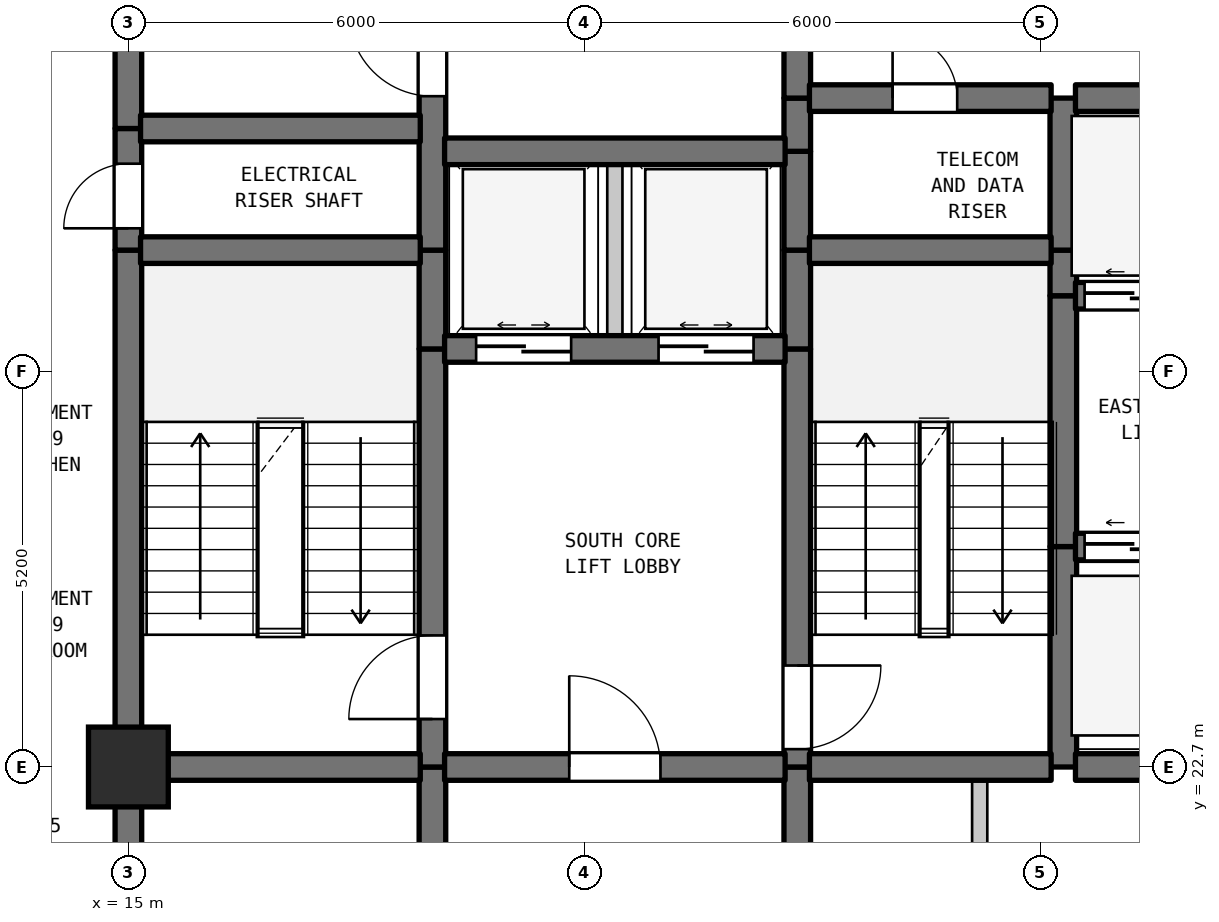
"""IFC4 building model, lengths in metres.
Left out: names, types, materials, properties, quantities, classifications, styles, units other than length and angle.
Written with IfcOpenShell. Run it as: python <this file> out.ifc"""

import sys

from ifc_helpers import new_model, si_unit, direction, frame, frame_2d, origin, origin_2d, place, context, subcontext, project, spatial, rectangle, extrude, element, fill, save


model = new_model("IFC4")
c1 = context("Model", 3, precision=1e-05, world=origin(), true_north=direction((0.0, 1.0)))
c2 = subcontext(c1, "Body", "Model", "MODEL_VIEW")
j1 = project(units=[si_unit("LENGTHUNIT", "METRE"), si_unit("PLANEANGLEUNIT", "RADIAN")], contexts=[c1])
p1 = place(None, origin())
s1 = spatial("IfcSite", under=j1, at=p1, CompositionType="ELEMENT")
p2 = place(p1, origin())
s2 = spatial("IfcBuilding", under=s1, at=p2, CompositionType="ELEMENT")
p3 = place(p2, frame((0.0, 0.0, 102.0)))
s3 = spatial("IfcBuildingStorey", under=s2, at=p3, CompositionType="ELEMENT", Elevation=102.0)
p4 = place(p3, frame((15.0, 22.7, 0.0), z_axis=(0.0, 0.0, 1.0), x_axis=(1.0, 0.0, 0.0)))
e1 = element("IfcColumn", 1, at=p4, inside=s3, PredefinedType="COLUMN", context=c2, shape_type="SweptSolid", body=[
    extrude(rectangle(XDim=1.05, YDim=1.05, at=origin_2d()), origin(), (0.0, 0.0, 1.0), 3.7),
])
p5 = place(p3, frame((15.0, 19.5, 0.0), z_axis=(0.0, 0.0, 1.0), x_axis=(0.0, 1.0, 0.0)))
e2 = element("IfcWall", 2, at=p5, inside=s3, PredefinedType="SHEAR", context=c2, shape_type="SweptSolid", body=[
    extrude(rectangle(XDim=3.2, YDim=0.35, at=frame_2d((1.6, 0.0))), origin(), (0.0, 0.0, 1.0), 3.385),
])
p6 = place(p3, frame((15.0, 22.7, 0.0), z_axis=(0.0, 0.0, 1.0), x_axis=(0.0, 1.0, 0.0)))
e3 = element("IfcWall", 3, at=p6, inside=s3, PredefinedType="SHEAR", context=c2, shape_type="SweptSolid", body=[
    extrude(rectangle(XDim=6.8, YDim=0.35, at=frame_2d((3.4, 0.0))), origin(), (0.0, 0.0, 1.0), 3.385),
])
p7 = place(p3, frame((15.0, 29.5, 0.0), z_axis=(0.0, 0.0, 1.0), x_axis=(0.0, 1.0, 0.0)))
e4 = element("IfcWall", 4, at=p7, inside=s3, PredefinedType="SHEAR", context=c2, shape_type="SweptSolid", body=[
    extrude(rectangle(XDim=1.6, YDim=0.35, at=frame_2d((0.8, 0.0))), origin(), (0.0, 0.0, 1.0), 3.385),
])
p8 = place(p7, frame((0.287, 0.0, 0.0)))
e5 = element("IfcOpeningElement", 5, at=p8, cuts=e4, PredefinedType="OPENING", context=c2, shape_type="SweptSolid", body=[
    extrude(rectangle(XDim=0.85, YDim=2.1, at=frame_2d((0.425, 1.05))), frame((0.0, 0.185, 0.0), z_axis=(0.0, -1.0, 0.0), x_axis=(1.0, 0.0, 0.0)), (0.0, 0.0, 1.0), 0.37),
])
p9 = place(p3, frame((15.0, 31.1, 0.0), z_axis=(0.0, 0.0, 1.0), x_axis=(0.0, 1.0, 0.0)))
e6 = element("IfcWall", 6, at=p9, inside=s3, PredefinedType="SHEAR", context=c2, shape_type="SweptSolid", body=[
    extrude(rectangle(XDim=6.8, YDim=0.35, at=frame_2d((3.4, 0.0))), origin(), (0.0, 0.0, 1.0), 3.385),
])
p10 = place(p3, frame((19.0, 19.5, 0.0), z_axis=(0.0, 0.0, 1.0), x_axis=(0.0, 1.0, 0.0)))
e7 = element("IfcWall", 7, at=p10, inside=s3, PredefinedType="SHEAR", context=c2, shape_type="SweptSolid", body=[
    extrude(rectangle(XDim=3.2, YDim=0.35, at=frame_2d((1.6, 0.0))), origin(), (0.0, 0.0, 1.0), 3.385),
])
p11 = place(p3, frame((19.0, 22.7, 0.0), z_axis=(0.0, 0.0, 1.0), x_axis=(0.0, 1.0, 0.0)))
e8 = element("IfcWall", 8, at=p11, inside=s3, PredefinedType="SHEAR", context=c2, shape_type="SweptSolid", body=[
    extrude(rectangle(XDim=5.5, YDim=0.35, at=frame_2d((2.75, 0.0))), origin(), (0.0, 0.0, 1.0), 3.385),
])
p12 = place(p11, frame((0.631, 0.0, 0.0)))
e9 = element("IfcOpeningElement", 9, at=p12, cuts=e8, PredefinedType="OPENING", context=c2, shape_type="SweptSolid", body=[
    extrude(rectangle(XDim=1.1, YDim=2.15, at=frame_2d((0.55, 1.075))), frame((0.0, 0.185, 0.0), z_axis=(0.0, -1.0, 0.0), x_axis=(1.0, 0.0, 0.0)), (0.0, 0.0, 1.0), 0.37),
])
p13 = place(p3, frame((19.0, 28.2, 0.0), z_axis=(0.0, 0.0, 1.0), x_axis=(0.0, 1.0, 0.0)))
e10 = element("IfcWall", 10, at=p13, inside=s3, PredefinedType="SHEAR", context=c2, shape_type="SweptSolid", body=[
    extrude(rectangle(XDim=1.3, YDim=0.35, at=frame_2d((0.65, 0.0))), origin(), (0.0, 0.0, 1.0), 3.385),
])
p14 = place(p3, frame((19.0, 29.5, 0.0), z_axis=(0.0, 0.0, 1.0), x_axis=(0.0, 1.0, 0.0)))
e11 = element("IfcWall", 11, at=p14, inside=s3, PredefinedType="SHEAR", context=c2, shape_type="SweptSolid", body=[
    extrude(rectangle(XDim=5.5, YDim=0.35, at=frame_2d((2.75, 0.0))), origin(), (0.0, 0.0, 1.0), 3.385),
])
p15 = place(p14, frame((2.025, 0.0, 0.0)))
e12 = element("IfcOpeningElement", 12, at=p15, cuts=e11, PredefinedType="OPENING", context=c2, shape_type="SweptSolid", body=[
    extrude(rectangle(XDim=1.1, YDim=2.15, at=frame_2d((0.55, 1.075))), frame((0.0, 0.185, 0.0), z_axis=(0.0, -1.0, 0.0), x_axis=(1.0, 0.0, 0.0)), (0.0, 0.0, 1.0), 0.37),
])
p16 = place(p3, frame((21.4, 28.2, 0.0), z_axis=(0.0, 0.0, 1.0), x_axis=(0.0, 1.0, 0.0)))
e13 = element("IfcWall", 13, at=p16, inside=s3, PredefinedType="STANDARD", context=c2, shape_type="SweptSolid", body=[
    extrude(rectangle(XDim=2.6, YDim=0.2, at=frame_2d((1.3, 0.0))), origin(), (0.0, 0.0, 1.0), 3.385),
])
p17 = place(p3, frame((23.8, 19.5, 0.0), z_axis=(0.0, 0.0, 1.0), x_axis=(0.0, 1.0, 0.0)))
e14 = element("IfcWall", 14, at=p17, inside=s3, PredefinedType="SHEAR", context=c2, shape_type="SweptSolid", body=[
    extrude(rectangle(XDim=3.2, YDim=0.35, at=frame_2d((1.6, 0.0))), origin(), (0.0, 0.0, 1.0), 3.385),
])
p18 = place(p3, frame((23.8, 22.7, 0.0), z_axis=(0.0, 0.0, 1.0), x_axis=(0.0, 1.0, 0.0)))
e15 = element("IfcWall", 15, at=p18, inside=s3, PredefinedType="SHEAR", context=c2, shape_type="SweptSolid", body=[
    extrude(rectangle(XDim=5.5, YDim=0.35, at=frame_2d((2.75, 0.0))), origin(), (0.0, 0.0, 1.0), 3.385),
])
p19 = place(p18, frame((0.235, 0.0, 0.0)))
e16 = element("IfcOpeningElement", 16, at=p19, cuts=e15, PredefinedType="OPENING", context=c2, shape_type="SweptSolid", body=[
    extrude(rectangle(XDim=1.1, YDim=2.15, at=frame_2d((0.55, 1.075))), frame((0.0, 0.185, 0.0), z_axis=(0.0, -1.0, 0.0), x_axis=(1.0, 0.0, 0.0)), (0.0, 0.0, 1.0), 0.37),
])
for number, where, z_axis, x_axis in (
    (17, (23.8, 28.2, 0.0), (0.0, 0.0, 1.0), (0.0, 1.0, 0.0)),
    (18, (23.8, 29.5, 0.0), (0.0, 0.0, 1.0), (0.0, 1.0, 0.0)),
):
    element("IfcWall", number, at=place(p3, frame(where, z_axis=z_axis, x_axis=x_axis)), inside=s3, PredefinedType="SHEAR", context=c2, shape_type="SweptSolid", body=[
        extrude(rectangle(XDim=1.3, YDim=0.35, at=frame_2d((0.65, 0.0))), origin(), (0.0, 0.0, 1.0), 3.385),
    ])
p20 = place(p3, frame((23.8, 30.8, 0.0), z_axis=(0.0, 0.0, 1.0), x_axis=(0.0, 1.0, 0.0)))
e19 = element("IfcWall", 19, at=p20, inside=s3, PredefinedType="SHEAR", context=c2, shape_type="SweptSolid", body=[
    extrude(rectangle(XDim=0.7, YDim=0.35, at=frame_2d((0.35, 0.0))), origin(), (0.0, 0.0, 1.0), 3.385),
])
p21 = place(p3, frame((23.8, 31.5, 0.0), z_axis=(0.0, 0.0, 1.0), x_axis=(0.0, 1.0, 0.0)))
e20 = element("IfcWall", 20, at=p21, inside=s3, PredefinedType="SHEAR", context=c2, shape_type="SweptSolid", body=[
    extrude(rectangle(XDim=3.5, YDim=0.35, at=frame_2d((1.75, 0.0))), origin(), (0.0, 0.0, 1.0), 3.385),
])
p22 = place(p21, frame((1.127, 0.0, 0.0)))
e21 = element("IfcOpeningElement", 21, at=p22, cuts=e20, PredefinedType="OPENING", context=c2, shape_type="SweptSolid", body=[
    extrude(rectangle(XDim=1.1, YDim=2.15, at=frame_2d((0.55, 1.075))), frame((0.0, 0.185, 0.0), z_axis=(0.0, -1.0, 0.0), x_axis=(1.0, 0.0, 0.0)), (0.0, 0.0, 1.0), 0.37),
])
p23 = place(p3, frame((26.2, 19.5, 0.0), z_axis=(0.0, 0.0, 1.0), x_axis=(0.0, 1.0, 0.0)))
e22 = element("IfcWall", 22, at=p23, inside=s3, PredefinedType="STANDARD", context=c2, shape_type="SweptSolid", body=[
    extrude(rectangle(XDim=3.2, YDim=0.2, at=frame_2d((1.6, 0.0))), origin(), (0.0, 0.0, 1.0), 3.385),
])
p24 = place(p3, frame((27.3, 22.7, 0.0), z_axis=(0.0, 0.0, 1.0), x_axis=(0.0, 1.0, 0.0)))
e23 = element("IfcWall", 23, at=p24, inside=s3, PredefinedType="SHEAR", context=c2, shape_type="SweptSolid", body=[
    extrude(rectangle(XDim=2.9, YDim=0.35, at=frame_2d((1.45, 0.0))), origin(), (0.0, 0.0, 1.0), 3.385),
])
p25 = place(p3, frame((27.3, 25.6, 0.0), z_axis=(0.0, 0.0, 1.0), x_axis=(0.0, 1.0, 0.0)))
e24 = element("IfcWall", 24, at=p25, inside=s3, PredefinedType="SHEAR", context=c2, shape_type="SweptSolid", body=[
    extrude(rectangle(XDim=3.3, YDim=0.35, at=frame_2d((1.65, 0.0))), origin(), (0.0, 0.0, 1.0), 3.385),
])
p26 = place(p3, frame((27.3, 28.9, 0.0), z_axis=(0.0, 0.0, 1.0), x_axis=(0.0, 1.0, 0.0)))
e25 = element("IfcWall", 25, at=p26, inside=s3, PredefinedType="SHEAR", context=c2, shape_type="SweptSolid", body=[
    extrude(rectangle(XDim=0.6, YDim=0.35, at=frame_2d((0.3, 0.0))), origin(), (0.0, 0.0, 1.0), 3.385),
])
p27 = place(p3, frame((27.3, 29.5, 0.0), z_axis=(0.0, 0.0, 1.0), x_axis=(0.0, 1.0, 0.0)))
e26 = element("IfcWall", 26, at=p27, inside=s3, PredefinedType="SHEAR", context=c2, shape_type="SweptSolid", body=[
    extrude(rectangle(XDim=2.0, YDim=0.35, at=frame_2d((1.0, 0.0))), origin(), (0.0, 0.0, 1.0), 3.385),
])
p28 = place(p3, frame((15.16, 22.7, 0.0), z_axis=(0.0, 0.0, 1.0), x_axis=(1.0, 0.0, 0.0)))
e27 = element("IfcWall", 27, at=p28, inside=s3, PredefinedType="SHEAR", context=c2, shape_type="SweptSolid", body=[
    extrude(rectangle(XDim=3.68, YDim=0.35, at=frame_2d((1.84, 0.0))), origin(), (0.0, 0.0, 1.0), 3.385),
])
p29 = place(p3, frame((19.16, 22.7, 0.0), z_axis=(0.0, 0.0, 1.0), x_axis=(1.0, 0.0, 0.0)))
e28 = element("IfcWall", 28, at=p29, inside=s3, PredefinedType="SHEAR", context=c2, shape_type="SweptSolid", body=[
    extrude(rectangle(XDim=4.48, YDim=0.35, at=frame_2d((2.24, 0.0))), origin(), (0.0, 0.0, 1.0), 3.385),
])
p30 = place(p29, frame((1.64, 0.0, 0.0)))
e29 = element("IfcOpeningElement", 29, at=p30, cuts=e28, PredefinedType="OPENING", context=c2, shape_type="SweptSolid", body=[
    extrude(rectangle(XDim=1.2, YDim=2.2, at=frame_2d((0.6, 1.1))), frame((0.0, 0.185, 0.0), z_axis=(0.0, -1.0, 0.0), x_axis=(1.0, 0.0, 0.0)), (0.0, 0.0, 1.0), 0.37),
])
p31 = place(p3, frame((23.96, 22.7, 0.0), z_axis=(0.0, 0.0, 1.0), x_axis=(1.0, 0.0, 0.0)))
e30 = element("IfcWall", 30, at=p31, inside=s3, PredefinedType="SHEAR", context=c2, shape_type="SweptSolid", body=[
    extrude(rectangle(XDim=3.18, YDim=0.35, at=frame_2d((1.59, 0.0))), origin(), (0.0, 0.0, 1.0), 3.385),
])
p32 = place(p3, frame((27.46, 22.7, 0.0), z_axis=(0.0, 0.0, 1.0), x_axis=(1.0, 0.0, 0.0)))
e31 = element("IfcWall", 31, at=p32, inside=s3, PredefinedType="SHEAR", context=c2, shape_type="SweptSolid", body=[
    extrude(rectangle(XDim=0.955, YDim=0.35, at=frame_2d((0.478, 0.0))), origin(), (0.0, 0.0, 1.0), 3.385),
])
p33 = place(p3, frame((27.46, 25.6, 0.0), z_axis=(0.0, 0.0, 1.0), x_axis=(1.0, 0.0, 0.0)))
e32 = element("IfcWall", 32, at=p33, inside=s3, PredefinedType="SHEAR", context=c2, shape_type="SweptSolid", body=[
    extrude(rectangle(XDim=3.18, YDim=0.35, at=frame_2d((1.59, 0.0))), origin(), (0.0, 0.0, 1.0), 3.385),
])
p34 = place(p33, frame((0.12, 0.0, 0.0)))
e33 = element("IfcOpeningElement", 33, at=p34, cuts=e32, PredefinedType="OPENING", context=c2, shape_type="SweptSolid", body=[
    extrude(rectangle(XDim=1.25, YDim=2.2, at=frame_2d((0.625, 1.1))), frame((0.0, 0.185, 0.0), z_axis=(0.0, -1.0, 0.0), x_axis=(1.0, 0.0, 0.0)), (0.0, 0.0, 1.0), 0.37),
])
p35 = place(p33, frame((1.81, 0.0, 0.0)))
e34 = element("IfcOpeningElement", 34, at=p35, cuts=e32, PredefinedType="OPENING", context=c2, shape_type="SweptSolid", body=[
    extrude(rectangle(XDim=1.25, YDim=2.2, at=frame_2d((0.625, 1.1))), frame((0.0, 0.185, 0.0), z_axis=(0.0, -1.0, 0.0), x_axis=(1.0, 0.0, 0.0)), (0.0, 0.0, 1.0), 0.37),
])
p36 = place(p3, frame((19.16, 28.2, 0.0), z_axis=(0.0, 0.0, 1.0), x_axis=(1.0, 0.0, 0.0)))
e35 = element("IfcWall", 35, at=p36, inside=s3, PredefinedType="SHEAR", context=c2, shape_type="SweptSolid", body=[
    extrude(rectangle(XDim=4.48, YDim=0.35, at=frame_2d((2.24, 0.0))), origin(), (0.0, 0.0, 1.0), 3.385),
])
p37 = place(p36, frame((0.415, 0.0, 0.0)))
e36 = element("IfcOpeningElement", 36, at=p37, cuts=e35, PredefinedType="OPENING", context=c2, shape_type="SweptSolid", body=[
    extrude(rectangle(XDim=1.25, YDim=2.2, at=frame_2d((0.625, 1.1))), frame((0.0, 0.185, 0.0), z_axis=(0.0, -1.0, 0.0), x_axis=(1.0, 0.0, 0.0)), (0.0, 0.0, 1.0), 0.37),
])
p38 = place(p36, frame((2.815, 0.0, 0.0)))
e37 = element("IfcOpeningElement", 37, at=p38, cuts=e35, PredefinedType="OPENING", context=c2, shape_type="SweptSolid", body=[
    extrude(rectangle(XDim=1.25, YDim=2.2, at=frame_2d((0.625, 1.1))), frame((0.0, 0.185, 0.0), z_axis=(0.0, -1.0, 0.0), x_axis=(1.0, 0.0, 0.0)), (0.0, 0.0, 1.0), 0.37),
])
p39 = place(p3, frame((27.46, 28.9, 0.0), z_axis=(0.0, 0.0, 1.0), x_axis=(1.0, 0.0, 0.0)))
e38 = element("IfcWall", 38, at=p39, inside=s3, PredefinedType="SHEAR", context=c2, shape_type="SweptSolid", body=[
    extrude(rectangle(XDim=3.18, YDim=0.35, at=frame_2d((1.59, 0.0))), origin(), (0.0, 0.0, 1.0), 3.385),
])
p40 = place(p39, frame((0.12, 0.0, 0.0)))
e39 = element("IfcOpeningElement", 39, at=p40, cuts=e38, PredefinedType="OPENING", context=c2, shape_type="SweptSolid", body=[
    extrude(rectangle(XDim=1.25, YDim=2.2, at=frame_2d((0.625, 1.1))), frame((0.0, 0.185, 0.0), z_axis=(0.0, -1.0, 0.0), x_axis=(1.0, 0.0, 0.0)), (0.0, 0.0, 1.0), 0.37),
])
p41 = place(p39, frame((1.81, 0.0, 0.0)))
e40 = element("IfcOpeningElement", 40, at=p41, cuts=e38, PredefinedType="OPENING", context=c2, shape_type="SweptSolid", body=[
    extrude(rectangle(XDim=1.25, YDim=2.2, at=frame_2d((0.625, 1.1))), frame((0.0, 0.185, 0.0), z_axis=(0.0, -1.0, 0.0), x_axis=(1.0, 0.0, 0.0)), (0.0, 0.0, 1.0), 0.37),
])
p42 = place(p3, frame((15.16, 29.5, 0.0), z_axis=(0.0, 0.0, 1.0), x_axis=(1.0, 0.0, 0.0)))
e41 = element("IfcWall", 41, at=p42, inside=s3, PredefinedType="SHEAR", context=c2, shape_type="SweptSolid", body=[
    extrude(rectangle(XDim=3.68, YDim=0.35, at=frame_2d((1.84, 0.0))), origin(), (0.0, 0.0, 1.0), 3.385),
])
p43 = place(p3, frame((23.96, 29.5, 0.0), z_axis=(0.0, 0.0, 1.0), x_axis=(1.0, 0.0, 0.0)))
e42 = element("IfcWall", 42, at=p43, inside=s3, PredefinedType="SHEAR", context=c2, shape_type="SweptSolid", body=[
    extrude(rectangle(XDim=3.18, YDim=0.35, at=frame_2d((1.59, 0.0))), origin(), (0.0, 0.0, 1.0), 3.385),
])
p44 = place(p3, frame((19.16, 30.8, 0.0), z_axis=(0.0, 0.0, 1.0), x_axis=(1.0, 0.0, 0.0)))
e43 = element("IfcWall", 43, at=p44, inside=s3, PredefinedType="SHEAR", context=c2, shape_type="SweptSolid", body=[
    extrude(rectangle(XDim=4.48, YDim=0.35, at=frame_2d((2.24, 0.0))), origin(), (0.0, 0.0, 1.0), 3.385),
])
p45 = place(p3, frame((15.16, 31.1, 0.0), z_axis=(0.0, 0.0, 1.0), x_axis=(1.0, 0.0, 0.0)))
e44 = element("IfcWall", 44, at=p45, inside=s3, PredefinedType="SHEAR", context=c2, shape_type="SweptSolid", body=[
    extrude(rectangle(XDim=3.68, YDim=0.35, at=frame_2d((1.84, 0.0))), origin(), (0.0, 0.0, 1.0), 3.385),
])
p46 = place(p3, frame((23.96, 31.5, 0.0), z_axis=(0.0, 0.0, 1.0), x_axis=(1.0, 0.0, 0.0)))
e45 = element("IfcWall", 45, at=p46, inside=s3, PredefinedType="SHEAR", context=c2, shape_type="SweptSolid", body=[
    extrude(rectangle(XDim=3.18, YDim=0.35, at=frame_2d((1.59, 0.0))), origin(), (0.0, 0.0, 1.0), 3.385),
])
p47 = place(p46, frame((1.094, 0.0, 0.0)))
e46 = element("IfcOpeningElement", 46, at=p47, cuts=e45, PredefinedType="OPENING", context=c2, shape_type="SweptSolid", body=[
    extrude(rectangle(XDim=0.85, YDim=2.1, at=frame_2d((0.425, 1.05))), frame((0.0, 0.185, 0.0), z_axis=(0.0, -1.0, 0.0), x_axis=(1.0, 0.0, 0.0)), (0.0, 0.0, 1.0), 0.37),
])
p48 = place(p3, frame((27.46, 31.5, 0.0), z_axis=(0.0, 0.0, 1.0), x_axis=(1.0, 0.0, 0.0)))
e47 = element("IfcWall", 47, at=p48, inside=s3, PredefinedType="SHEAR", context=c2, shape_type="SweptSolid", body=[
    extrude(rectangle(XDim=3.18, YDim=0.35, at=frame_2d((1.59, 0.0))), origin(), (0.0, 0.0, 1.0), 3.385),
])
p49 = place(p8, origin())
e48 = element("IfcDoor", 48, at=p49, inside=s3, OperationType="SINGLE_SWING_LEFT", PredefinedType="DOOR", context=c2, shape_type="SweptSolid", body=[
    extrude(rectangle(XDim=0.85, YDim=2.1, at=frame_2d((0.425, 1.05))), frame((0.0, 0.025, 0.0), z_axis=(0.0, -1.0, 0.0), x_axis=(1.0, 0.0, 0.0)), (0.0, 0.0, 1.0), 0.05),
])
fill(e5, e48)
p50 = place(p12, origin())
e49 = element("IfcDoor", 49, at=p50, inside=s3, OperationType="SINGLE_SWING_LEFT", PredefinedType="DOOR", context=c2, shape_type="SweptSolid", body=[
    extrude(rectangle(XDim=1.1, YDim=2.15, at=frame_2d((0.55, 1.075))), frame((0.0, 0.025, 0.0), z_axis=(0.0, -1.0, 0.0), x_axis=(1.0, 0.0, 0.0)), (0.0, 0.0, 1.0), 0.05),
])
fill(e9, e49)
p51 = place(p15, origin())
e50 = element("IfcDoor", 50, at=p51, inside=s3, OperationType="SINGLE_SWING_RIGHT", PredefinedType="DOOR", context=c2, shape_type="SweptSolid", body=[
    extrude(rectangle(XDim=1.1, YDim=2.15, at=frame_2d((0.55, 1.075))), frame((0.0, 0.025, 0.0), z_axis=(0.0, -1.0, 0.0), x_axis=(1.0, 0.0, 0.0)), (0.0, 0.0, 1.0), 0.05),
])
fill(e12, e50)
p52 = place(p19, frame((1.1, 0.0, 0.0), z_axis=(0.0, 0.0, 1.0), x_axis=(-1.0, 0.0, 0.0)))
e51 = element("IfcDoor", 51, at=p52, inside=s3, OperationType="SINGLE_SWING_RIGHT", PredefinedType="DOOR", context=c2, shape_type="SweptSolid", body=[
    extrude(rectangle(XDim=1.1, YDim=2.15, at=frame_2d((0.55, 1.075))), frame((0.0, 0.025, 0.0), z_axis=(0.0, -1.0, 0.0), x_axis=(1.0, 0.0, 0.0)), (0.0, 0.0, 1.0), 0.05),
])
fill(e16, e51)
p53 = place(p30, origin())
e52 = element("IfcDoor", 52, at=p53, inside=s3, OperationType="SINGLE_SWING_LEFT", PredefinedType="DOOR", context=c2, shape_type="SweptSolid", body=[
    extrude(rectangle(XDim=1.2, YDim=2.2, at=frame_2d((0.6, 1.1))), frame((0.0, 0.025, 0.0), z_axis=(0.0, -1.0, 0.0), x_axis=(1.0, 0.0, 0.0)), (0.0, 0.0, 1.0), 0.05),
])
fill(e29, e52)
p54 = place(p34, origin())
e53 = element("IfcDoor", 53, at=p54, inside=s3, OperationType="DOUBLE_DOOR_SLIDING", PredefinedType="DOOR", context=c2, shape_type="SweptSolid", body=[
    extrude(rectangle(XDim=1.25, YDim=2.2, at=frame_2d((0.625, 1.1))), frame((0.0, 0.025, 0.0), z_axis=(0.0, -1.0, 0.0), x_axis=(1.0, 0.0, 0.0)), (0.0, 0.0, 1.0), 0.05),
])
fill(e33, e53)
p55 = place(p37, origin())
e54 = element("IfcDoor", 54, at=p55, inside=s3, OperationType="DOUBLE_DOOR_SLIDING", PredefinedType="DOOR", context=c2, shape_type="SweptSolid", body=[
    extrude(rectangle(XDim=1.25, YDim=2.2, at=frame_2d((0.625, 1.1))), frame((0.0, 0.025, 0.0), z_axis=(0.0, -1.0, 0.0), x_axis=(1.0, 0.0, 0.0)), (0.0, 0.0, 1.0), 0.05),
])
fill(e36, e54)
p56 = place(p38, origin())
e55 = element("IfcDoor", 55, at=p56, inside=s3, OperationType="DOUBLE_DOOR_SLIDING", PredefinedType="DOOR", context=c2, shape_type="SweptSolid", body=[
    extrude(rectangle(XDim=1.25, YDim=2.2, at=frame_2d((0.625, 1.1))), frame((0.0, 0.025, 0.0), z_axis=(0.0, -1.0, 0.0), x_axis=(1.0, 0.0, 0.0)), (0.0, 0.0, 1.0), 0.05),
])
fill(e37, e55)
p57 = place(p40, origin())
e56 = element("IfcDoor", 56, at=p57, inside=s3, OperationType="DOUBLE_DOOR_SLIDING", PredefinedType="DOOR", context=c2, shape_type="SweptSolid", body=[
    extrude(rectangle(XDim=1.25, YDim=2.2, at=frame_2d((0.625, 1.1))), frame((0.0, 0.025, 0.0), z_axis=(0.0, -1.0, 0.0), x_axis=(1.0, 0.0, 0.0)), (0.0, 0.0, 1.0), 0.05),
])
fill(e39, e56)
p58 = place(p47, origin())
e57 = element("IfcDoor", 57, at=p58, inside=s3, OperationType="SINGLE_SWING_LEFT", PredefinedType="DOOR", context=c2, shape_type="SweptSolid", body=[
    extrude(rectangle(XDim=0.85, YDim=2.1, at=frame_2d((0.425, 1.05))), frame((0.0, 0.025, 0.0), z_axis=(0.0, -1.0, 0.0), x_axis=(1.0, 0.0, 0.0)), (0.0, 0.0, 1.0), 0.05),
])
fill(e46, e57)
save(model, sys.argv[1])
